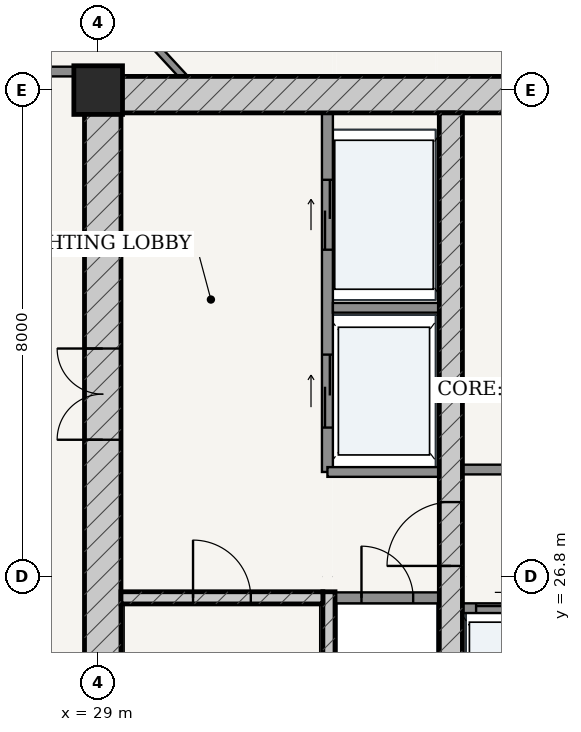
"""IFC4 building model, lengths in metres.
Left out: names, types, materials, properties, quantities, classifications, styles, units other than length and angle.
Written with IfcOpenShell. Run it as: python <this file> out.ifc"""

import sys

from ifc_helpers import new_model, si_unit, direction, frame, frame_2d, origin, origin_2d, place, context, subcontext, project, spatial, rectangle, extrude, source, transform, mapped, element, fill, save


model = new_model("IFC4")
c1 = context("Model", 3, precision=1e-05, world=origin(), true_north=direction((-0.2419218956, 0.970295726276)))
c2 = subcontext(c1, "Body", "Model", "MODEL_VIEW")
j1 = project(units=[si_unit("LENGTHUNIT", "METRE"), si_unit("PLANEANGLEUNIT", "RADIAN")], contexts=[c1])
p1 = place(None, origin())
s1 = spatial("IfcSite", under=j1, at=p1, CompositionType="ELEMENT")
p2 = place(p1, origin())
s2 = spatial("IfcBuilding", under=s1, at=p2, CompositionType="ELEMENT")
p3 = place(p2, frame((0.0, 0.0, 235.6)))
s3 = spatial("IfcBuildingStorey", under=s2, at=p3, CompositionType="ELEMENT", Elevation=235.6)
p4 = place(p3, frame((29.0, 34.8, 0.0), z_axis=(0.0, 0.0, 1.0), x_axis=(1.0, 0.0, 0.0)))
e1 = element("IfcColumn", 1, at=p4, inside=s3, PredefinedType="COLUMN", context=c2, shape_type="SweptSolid", body=[
    extrude(rectangle(XDim=0.8, YDim=0.8, at=origin_2d()), origin(), (0.0, 0.0, 1.0), 3.7),
])
p5 = place(p3, frame((28.775, 34.725, 0.0), z_axis=(0.0, 0.0, 1.0), x_axis=(1.0, 0.0, 0.0)))
e2 = element("IfcWall", 2, at=p5, inside=s3, PredefinedType="SHEAR", context=c2, shape_type="SweptSolid", body=[
    extrude(rectangle(XDim=18.45, YDim=0.6, at=frame_2d((9.225, 0.0))), origin(), (0.0, 0.0, 1.0), 3.435),
])
p6 = place(p3, frame((29.075, 19.175, 0.0), z_axis=(0.0, 0.0, 1.0), x_axis=(0.0, 1.0, 0.0)))
e3 = element("IfcWall", 3, at=p6, inside=s3, PredefinedType="SHEAR", context=c2, shape_type="SweptSolid", body=[
    extrude(rectangle(XDim=15.25, YDim=0.6, at=frame_2d((7.625, 0.0))), origin(), (0.0, 0.0, 1.0), 3.435),
])
p7 = place(p6, frame((9.875, 0.0, 0.0)))
e4 = element("IfcOpeningElement", 4, at=p7, cuts=e3, PredefinedType="OPENING", context=c2, shape_type="SweptSolid", body=[
    extrude(rectangle(XDim=1.5, YDim=2.2, at=frame_2d((0.75, 1.1))), frame((0.0, 0.31, 0.0), z_axis=(0.0, -1.0, 0.0), x_axis=(1.0, 0.0, 0.0)), (0.0, 0.0, 1.0), 0.62),
])
p8 = place(p3, frame((32.795, 19.175, 0.0), z_axis=(0.0, 0.0, 1.0), x_axis=(0.0, 1.0, 0.0)))
e5 = element("IfcWall", 5, at=p8, inside=s3, PredefinedType="SOLIDWALL", context=c2, shape_type="SweptSolid", body=[
    extrude(rectangle(XDim=7.375, YDim=0.2, at=frame_2d((3.688, 0.0))), origin(), (0.0, 0.0, 1.0), 3.435),
])
p9 = place(p3, frame((29.375, 26.45, 0.0), z_axis=(0.0, 0.0, 1.0), x_axis=(1.0, 0.0, 0.0)))
e6 = element("IfcWall", 6, at=p9, inside=s3, PredefinedType="SOLIDWALL", context=c2, shape_type="SweptSolid", body=[
    extrude(rectangle(XDim=3.32, YDim=0.2, at=frame_2d((1.66, 0.0))), origin(), (0.0, 0.0, 1.0), 3.435),
])
p10 = place(p9, frame((1.185, 0.0, 0.0)))
e7 = element("IfcOpeningElement", 7, at=p10, cuts=e6, PredefinedType="OPENING", context=c2, shape_type="SweptSolid", body=[
    extrude(rectangle(XDim=0.95, YDim=2.15, at=frame_2d((0.475, 1.075))), frame((0.0, 0.11, 0.0), z_axis=(0.0, -1.0, 0.0), x_axis=(1.0, 0.0, 0.0)), (0.0, 0.0, 1.0), 0.22),
])
p11 = place(p3, frame((34.8, 19.175, 0.0), z_axis=(0.0, 0.0, 1.0), x_axis=(0.0, 1.0, 0.0)))
e8 = element("IfcWall", 8, at=p11, inside=s3, PredefinedType="SHEAR", context=c2, shape_type="SweptSolid", body=[
    extrude(rectangle(XDim=15.25, YDim=0.38, at=frame_2d((7.625, 0.0))), origin(), (0.0, 0.0, 1.0), 3.435),
])
p12 = place(p11, frame((7.8, 0.0, 0.0)))
e9 = element("IfcOpeningElement", 9, at=p12, cuts=e8, PredefinedType="OPENING", context=c2, shape_type="SweptSolid", body=[
    extrude(rectangle(XDim=1.05, YDim=2.15, at=frame_2d((0.525, 1.075))), frame((0.0, 0.2, 0.0), z_axis=(0.0, -1.0, 0.0), x_axis=(1.0, 0.0, 0.0)), (0.0, 0.0, 1.0), 0.4),
])
p13 = place(p3, frame((32.9, 26.45, 0.0), z_axis=(0.0, 0.0, 1.0), x_axis=(1.0, 0.0, 0.0)))
e10 = element("IfcWall", 10, at=p13, inside=s3, PredefinedType="PARTITIONING", context=c2, shape_type="SweptSolid", body=[
    extrude(rectangle(XDim=1.71, YDim=0.18, at=frame_2d((0.855, 0.0))), origin(), (0.0, 0.0, 1.0), 3.435),
])
p14 = place(p13, frame((0.43, 0.0, 0.0)))
e11 = element("IfcOpeningElement", 11, at=p14, cuts=e10, PredefinedType="OPENING", context=c2, shape_type="SweptSolid", body=[
    extrude(rectangle(XDim=0.85, YDim=2.1, at=frame_2d((0.425, 1.05))), frame((0.0, 0.1, 0.0), z_axis=(0.0, -1.0, 0.0), x_axis=(1.0, 0.0, 0.0)), (0.0, 0.0, 1.0), 0.2),
])
p15 = place(p3, frame((32.77, 28.52, 0.0), z_axis=(0.0, 0.0, 1.0), x_axis=(0.0, 1.0, 0.0)))
e12 = element("IfcWall", 12, at=p15, inside=s3, PredefinedType="PARTITIONING", context=c2, shape_type="SweptSolid", body=[
    extrude(rectangle(XDim=5.905, YDim=0.18, at=frame_2d((2.953, 0.0))), origin(), (0.0, 0.0, 1.0), 3.435),
])
p16 = place(p15, frame((3.655, 0.0, 0.0)))
e13 = element("IfcOpeningElement", 13, at=p16, cuts=e12, PredefinedType="OPENING", context=c2, shape_type="SweptSolid", body=[
    extrude(rectangle(XDim=1.15, YDim=2.2, at=frame_2d((0.575, 1.1))), frame((0.0, 0.1, 0.0), z_axis=(0.0, -1.0, 0.0), x_axis=(1.0, 0.0, 0.0)), (0.0, 0.0, 1.0), 0.2),
])
p17 = place(p15, frame((0.73, 0.0, 0.0)))
e14 = element("IfcOpeningElement", 14, at=p17, cuts=e12, PredefinedType="OPENING", context=c2, shape_type="SweptSolid", body=[
    extrude(rectangle(XDim=1.2, YDim=2.25, at=frame_2d((0.6, 1.125))), frame((0.0, 0.1, 0.0), z_axis=(0.0, -1.0, 0.0), x_axis=(1.0, 0.0, 0.0)), (0.0, 0.0, 1.0), 0.2),
])
p18 = place(p3, frame((32.86, 31.22, 0.0), z_axis=(0.0, 0.0, 1.0), x_axis=(1.0, 0.0, 0.0)))
e15 = element("IfcWall", 15, at=p18, inside=s3, PredefinedType="PARTITIONING", context=c2, shape_type="SweptSolid", body=[
    extrude(rectangle(XDim=1.75, YDim=0.16, at=frame_2d((0.875, 0.0))), origin(), (0.0, 0.0, 1.0), 3.435),
])
p19 = place(p3, frame((32.77, 28.52, 0.0), z_axis=(0.0, 0.0, 1.0), x_axis=(1.0, 0.0, 0.0)))
e16 = element("IfcWall", 16, at=p19, inside=s3, PredefinedType="PARTITIONING", context=c2, shape_type="SweptSolid", body=[
    extrude(rectangle(XDim=1.84, YDim=0.16, at=frame_2d((0.92, 0.0))), origin(), (0.0, 0.0, 1.0), 3.435),
])
p20 = place(p3, frame((34.99, 28.56, 0.0), z_axis=(0.0, 0.0, 1.0), x_axis=(1.0, 0.0, 0.0)))
e17 = element("IfcWall", 17, at=p20, inside=s3, PredefinedType="PARTITIONING", context=c2, shape_type="SweptSolid", body=[
    extrude(rectangle(XDim=6.02, YDim=0.16, at=frame_2d((3.01, 0.0))), origin(), (0.0, 0.0, 1.0), 3.435),
])
p21 = place(p20, frame((1.025, 0.0, 0.0)))
e18 = element("IfcOpeningElement", 18, at=p21, cuts=e17, PredefinedType="OPENING", context=c2, shape_type="SweptSolid", body=[
    extrude(rectangle(XDim=0.86, YDim=2.1, at=frame_2d((0.43, 1.05))), frame((0.0, 0.09, 0.0), z_axis=(0.0, -1.0, 0.0), x_axis=(1.0, 0.0, 0.0)), (0.0, 0.0, 1.0), 0.18),
])
p22 = place(p20, frame((4.14, 0.0, 0.0)))
e19 = element("IfcOpeningElement", 19, at=p22, cuts=e17, PredefinedType="OPENING", context=c2, shape_type="SweptSolid", body=[
    extrude(rectangle(XDim=0.85, YDim=2.1, at=frame_2d((0.425, 1.05))), frame((0.0, 0.09, 0.0), z_axis=(0.0, -1.0, 0.0), x_axis=(1.0, 0.0, 0.0)), (0.0, 0.0, 1.0), 0.18),
])
p23 = place(p3, frame((34.99, 26.28, 0.0), z_axis=(0.0, 0.0, 1.0), x_axis=(1.0, 0.0, 0.0)))
e20 = element("IfcWall", 20, at=p23, inside=s3, PredefinedType="PARTITIONING", context=c2, shape_type="SweptSolid", body=[
    extrude(rectangle(XDim=6.02, YDim=0.16, at=frame_2d((3.01, 0.0))), origin(), (0.0, 0.0, 1.0), 3.435),
])
p24 = place(p23, frame((0.225, 0.0, 0.0)))
e21 = element("IfcOpeningElement", 21, at=p24, cuts=e20, PredefinedType="OPENING", context=c2, shape_type="SweptSolid", body=[
    extrude(rectangle(XDim=1.1, YDim=2.2, at=frame_2d((0.55, 1.1))), frame((0.0, 0.09, 0.0), z_axis=(0.0, -1.0, 0.0), x_axis=(1.0, 0.0, 0.0)), (0.0, 0.0, 1.0), 0.18),
])
p25 = place(p23, frame((1.705, 0.0, 0.0)))
e22 = element("IfcOpeningElement", 22, at=p25, cuts=e20, PredefinedType="OPENING", context=c2, shape_type="SweptSolid", body=[
    extrude(rectangle(XDim=1.1, YDim=2.2, at=frame_2d((0.55, 1.1))), frame((0.0, 0.09, 0.0), z_axis=(0.0, -1.0, 0.0), x_axis=(1.0, 0.0, 0.0)), (0.0, 0.0, 1.0), 0.18),
])
p26 = place(p3, frame((26.845, 35.105, 0.0), z_axis=(0.0, 0.0, 1.0), x_axis=(1.0, 0.0, 0.0)))
e23 = element("IfcWall", 23, at=p26, inside=s3, PredefinedType="PARTITIONING", context=c2, shape_type="SweptSolid", body=[
    extrude(rectangle(XDim=1.93, YDim=0.16, at=frame_2d((0.965, 0.0))), origin(), (0.0, 0.0, 1.0), 3.435),
])
p27 = place(p3, frame((30.396, 35.026, 0.0), z_axis=(0.0, 0.0, 1.0), x_axis=(-0.678748871003, 0.73437045836, 0.0)))
e24 = element("IfcWall", 24, at=p27, inside=s3, PredefinedType="PARTITIONING", context=c2, shape_type="SweptSolid", body=[
    extrude(rectangle(XDim=4.13, YDim=0.12, at=frame_2d((2.065, 0.0))), origin(), (0.0, 0.0, 1.0), 2.951),
])
m1 = source(origin(), c2, "Body", "SweptSolid", [
    extrude(rectangle(XDim=1.5, YDim=2.2, at=frame_2d((0.75, 1.1))), frame((0.0, 0.025, 0.0), z_axis=(0.0, -1.0, 0.0), x_axis=(1.0, 0.0, 0.0)), (0.0, 0.0, 1.0), 0.05),
])
p28 = place(p7, origin())
e25 = element("IfcDoor", 25, at=p28, inside=s3, OperationType="DOUBLE_DOOR_SINGLE_SWING", PredefinedType="DOOR", context=c2, shape_type="MappedRepresentation", body=[
    mapped(m1, transform((0.0, 0.0, 0.0), scale=1.0)),
])
fill(e4, e25)
m2 = source(origin(), c2, "Body", "SweptSolid", [
    extrude(rectangle(XDim=1.05, YDim=2.15, at=frame_2d((0.525, 1.075))), frame((0.0, 0.025, 0.0), z_axis=(0.0, -1.0, 0.0), x_axis=(1.0, 0.0, 0.0)), (0.0, 0.0, 1.0), 0.05),
])
p29 = place(p12, origin())
e26 = element("IfcDoor", 26, at=p29, inside=s3, OperationType="SINGLE_SWING_LEFT", PredefinedType="DOOR", context=c2, shape_type="MappedRepresentation", body=[
    mapped(m2, transform((0.0, 0.0, 0.0), scale=1.0)),
])
fill(e9, e26)
m3 = source(origin(), c2, "Body", "SweptSolid", [
    extrude(rectangle(XDim=0.95, YDim=2.15, at=frame_2d((0.475, 1.075))), frame((0.0, 0.025, 0.0), z_axis=(0.0, -1.0, 0.0), x_axis=(1.0, 0.0, 0.0)), (0.0, 0.0, 1.0), 0.05),
])
p30 = place(p10, origin())
e27 = element("IfcDoor", 27, at=p30, inside=s3, OperationType="SINGLE_SWING_LEFT", PredefinedType="DOOR", context=c2, shape_type="MappedRepresentation", body=[
    mapped(m3, transform((0.0, 0.0, 0.0), scale=1.0)),
])
fill(e7, e27)
m4 = source(origin(), c2, "Body", "SweptSolid", [
    extrude(rectangle(XDim=0.85, YDim=2.1, at=frame_2d((0.425, 1.05))), frame((0.0, 0.025, 0.0), z_axis=(0.0, -1.0, 0.0), x_axis=(1.0, 0.0, 0.0)), (0.0, 0.0, 1.0), 0.05),
])
p31 = place(p14, origin())
e28 = element("IfcDoor", 28, at=p31, inside=s3, OperationType="SINGLE_SWING_LEFT", PredefinedType="DOOR", context=c2, shape_type="MappedRepresentation", body=[
    mapped(m4, transform((0.0, 0.0, 0.0), scale=1.0)),
])
fill(e11, e28)
m5 = source(origin(), c2, "Body", "SweptSolid", [
    extrude(rectangle(XDim=1.15, YDim=2.2, at=frame_2d((0.575, 1.1))), frame((0.0, 0.025, 0.0), z_axis=(0.0, -1.0, 0.0), x_axis=(1.0, 0.0, 0.0)), (0.0, 0.0, 1.0), 0.05),
])
p32 = place(p16, origin())
e29 = element("IfcDoor", 29, at=p32, inside=s3, OperationType="DOUBLE_DOOR_SLIDING", PredefinedType="DOOR", context=c2, shape_type="MappedRepresentation", body=[
    mapped(m5, transform((0.0, 0.0, 0.0), scale=1.0)),
])
fill(e13, e29)
m6 = source(origin(), c2, "Body", "SweptSolid", [
    extrude(rectangle(XDim=1.2, YDim=2.25, at=frame_2d((0.6, 1.125))), frame((0.0, 0.025, 0.0), z_axis=(0.0, -1.0, 0.0), x_axis=(1.0, 0.0, 0.0)), (0.0, 0.0, 1.0), 0.05),
])
p33 = place(p17, origin())
e30 = element("IfcDoor", 30, at=p33, inside=s3, OperationType="DOUBLE_DOOR_SLIDING", PredefinedType="DOOR", context=c2, shape_type="MappedRepresentation", body=[
    mapped(m6, transform((0.0, 0.0, 0.0), scale=1.0)),
])
fill(e14, e30)
m7 = source(origin(), c2, "Body", "SweptSolid", [
    extrude(rectangle(XDim=1.1, YDim=2.2, at=frame_2d((0.55, 1.1))), frame((0.0, 0.025, 0.0), z_axis=(0.0, -1.0, 0.0), x_axis=(1.0, 0.0, 0.0)), (0.0, 0.0, 1.0), 0.05),
])
p34 = place(p24, origin())
e31 = element("IfcDoor", 31, at=p34, inside=s3, OperationType="DOUBLE_DOOR_SLIDING", PredefinedType="DOOR", context=c2, shape_type="MappedRepresentation", body=[
    mapped(m7, transform((0.0, 0.0, 0.0), scale=1.0)),
])
fill(e21, e31)
save(model, sys.argv[1])
